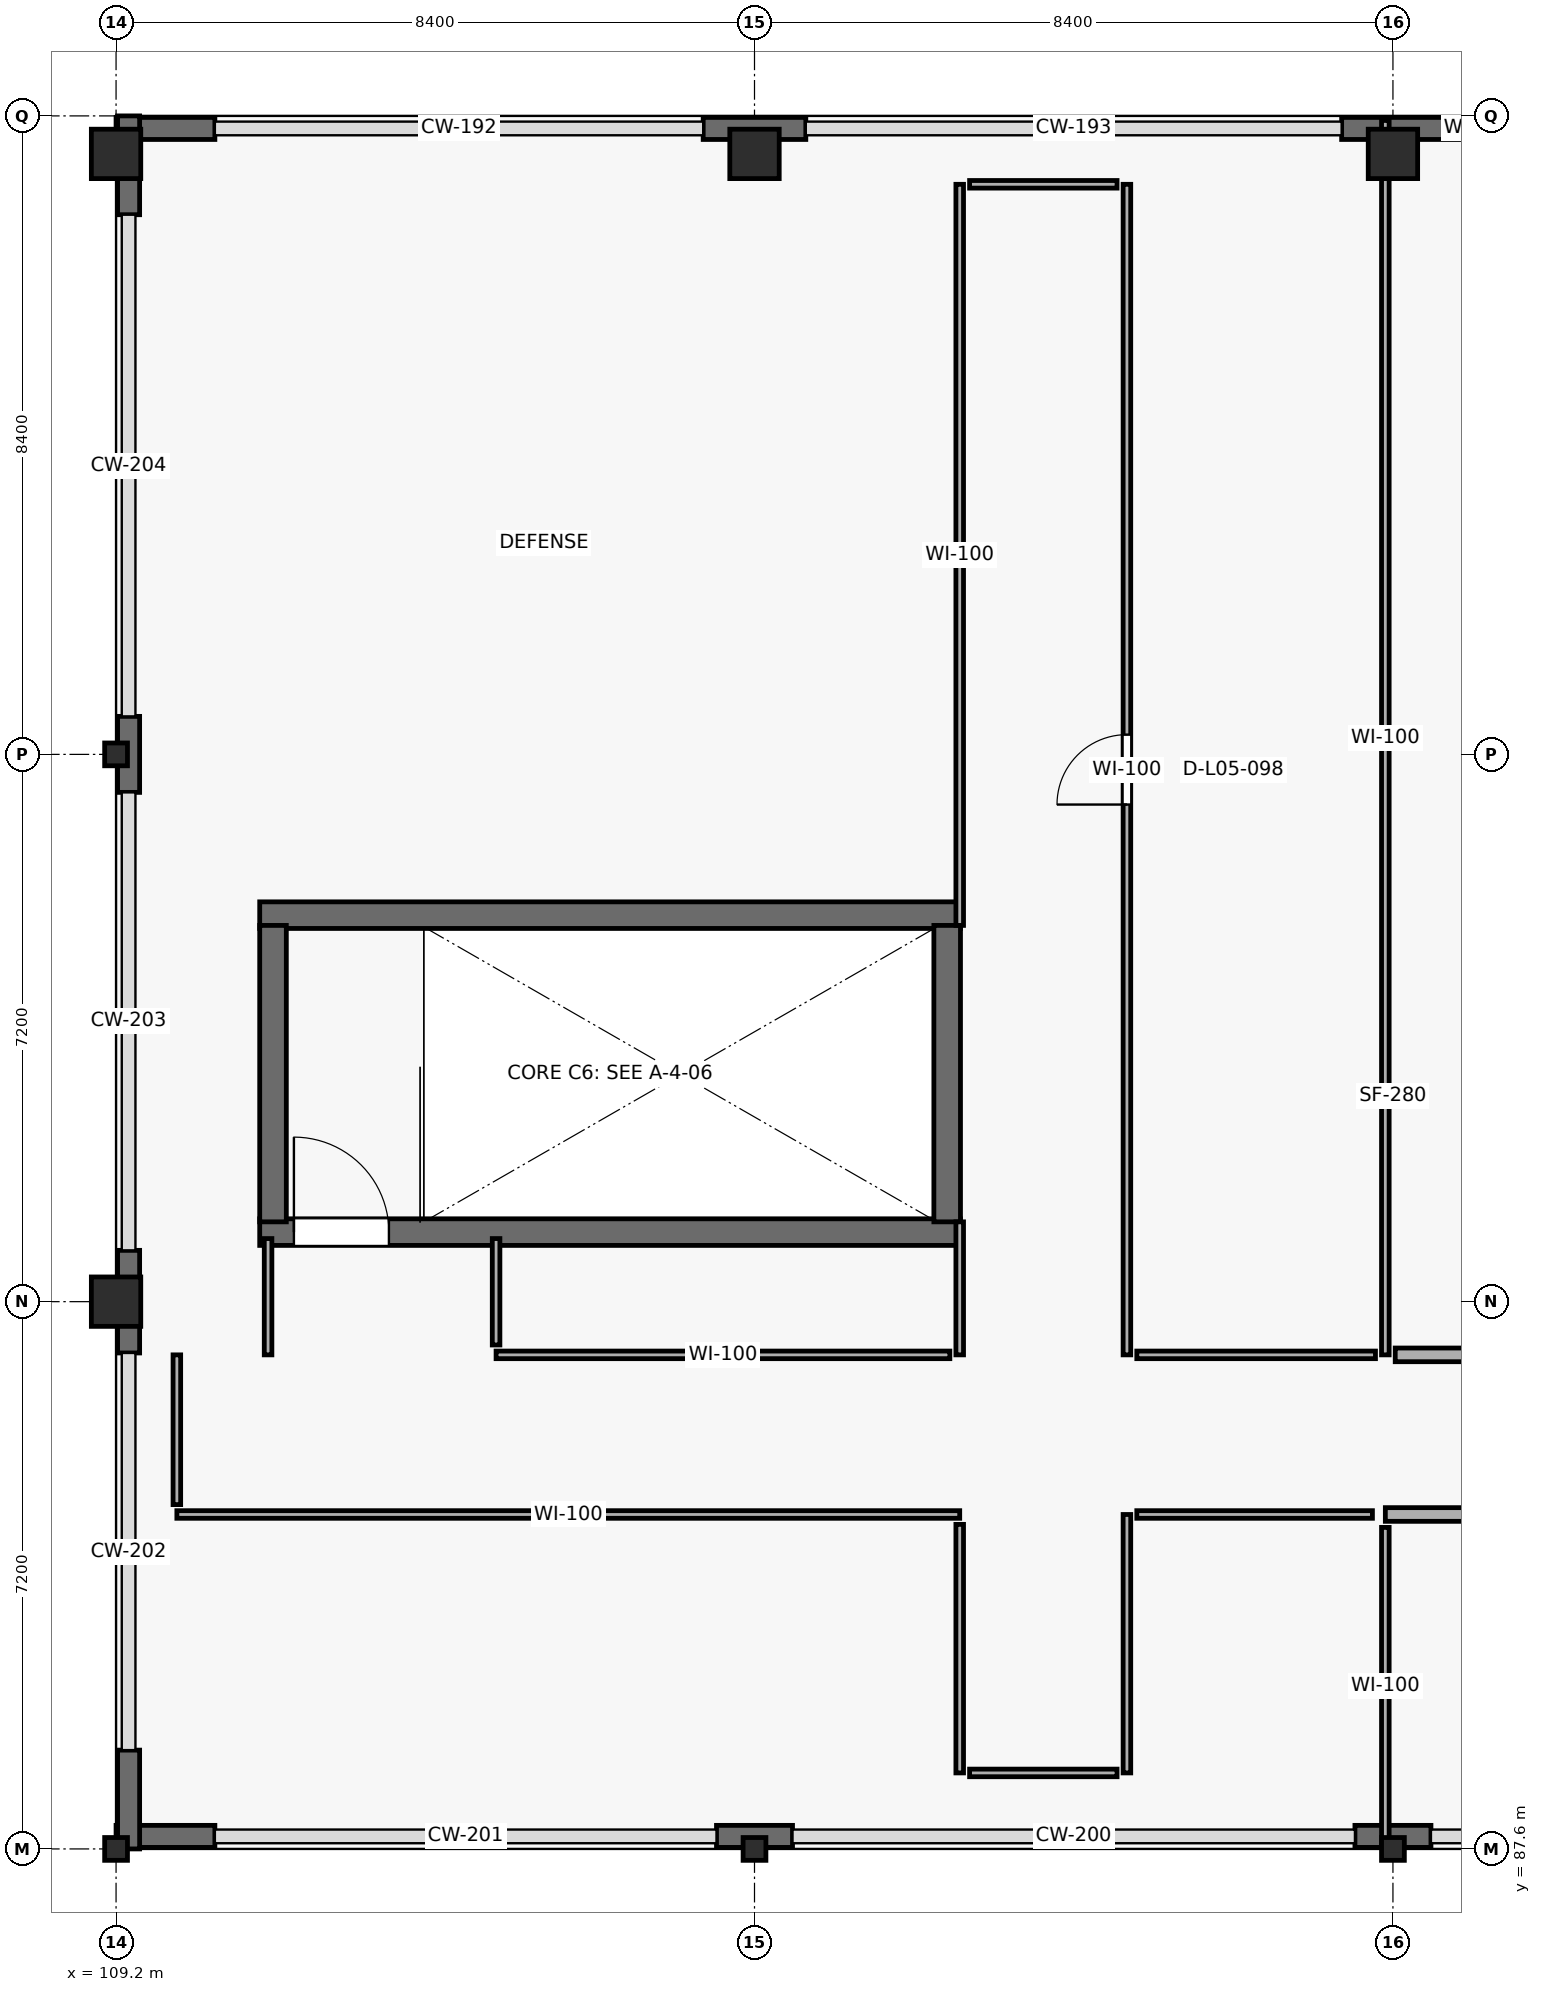
"""IFC4 building model, lengths in metres.
Left out: names, types, materials, properties, quantities, classifications, styles, units other than length and angle.
Written with IfcOpenShell. Run it as: python <this file> out.ifc"""

import sys

from ifc_helpers import new_model, si_unit, direction, frame, frame_2d, origin, origin_2d, place, context, subcontext, project, spatial, rectangle, hollow_rectangle, extrude, element, fill, save


model = new_model("IFC4")
c1 = context("Model", 3, precision=1e-05, world=origin(), true_north=direction((0.0, 1.0)))
c2 = subcontext(c1, "Body", "Model", "MODEL_VIEW")
j1 = project(units=[si_unit("LENGTHUNIT", "METRE"), si_unit("PLANEANGLEUNIT", "RADIAN")], contexts=[c1])
p1 = place(None, origin())
s1 = spatial("IfcSite", under=j1, at=p1, CompositionType="ELEMENT")
p2 = place(p1, origin())
s2 = spatial("IfcBuilding", under=s1, at=p2, CompositionType="ELEMENT")
p3 = place(p2, frame((0.0, 0.0, 20.4)))
s3 = spatial("IfcBuildingStorey", under=s2, at=p3, CompositionType="ELEMENT", Elevation=20.4)
p4 = place(p3, frame((109.2, 87.6, 0.0), z_axis=(0.0, 0.0, 1.0), x_axis=(1.0, 0.0, 0.0)))
e1 = element("IfcColumn", 1, at=p4, inside=s3, PredefinedType="COLUMN", context=c2, shape_type="SweptSolid", body=[
    extrude(hollow_rectangle(XDim=0.3, YDim=0.3, WallThickness=0.012, at=origin_2d()), origin(), (0.0, 0.0, 1.0), 5.1),
])
p5 = place(p3, frame((109.2, 94.8, 0.0), z_axis=(0.0, 0.0, 1.0), x_axis=(1.0, 0.0, 0.0)))
e2 = element("IfcColumn", 2, at=p5, inside=s3, PredefinedType="COLUMN", context=c2, shape_type="SweptSolid", body=[
    extrude(rectangle(XDim=0.65, YDim=0.65, at=origin_2d()), origin(), (0.0, 0.0, 1.0), 5.1),
])
p6 = place(p3, frame((109.2, 102.0, 0.0), z_axis=(0.0, 0.0, 1.0), x_axis=(1.0, 0.0, 0.0)))
e3 = element("IfcColumn", 3, at=p6, inside=s3, PredefinedType="COLUMN", context=c2, shape_type="SweptSolid", body=[
    extrude(hollow_rectangle(XDim=0.3, YDim=0.3, WallThickness=0.012, at=origin_2d()), origin(), (0.0, 0.0, 1.0), 5.1),
])
p7 = place(p3, frame((109.2, 109.9, 0.0), z_axis=(0.0, 0.0, 1.0), x_axis=(1.0, 0.0, 0.0)))
e4 = element("IfcColumn", 4, at=p7, inside=s3, PredefinedType="COLUMN", context=c2, shape_type="SweptSolid", body=[
    extrude(rectangle(XDim=0.65, YDim=0.65, at=origin_2d()), origin(), (0.0, 0.0, 1.0), 5.1),
])
p8 = place(p3, frame((117.6, 87.6, 0.0), z_axis=(0.0, 0.0, 1.0), x_axis=(1.0, 0.0, 0.0)))
e5 = element("IfcColumn", 5, at=p8, inside=s3, PredefinedType="COLUMN", context=c2, shape_type="SweptSolid", body=[
    extrude(hollow_rectangle(XDim=0.3, YDim=0.3, WallThickness=0.012, at=origin_2d()), origin(), (0.0, 0.0, 1.0), 5.1),
])
p9 = place(p3, frame((117.6, 109.9, 0.0), z_axis=(0.0, 0.0, 1.0), x_axis=(1.0, 0.0, 0.0)))
e6 = element("IfcColumn", 6, at=p9, inside=s3, PredefinedType="COLUMN", context=c2, shape_type="SweptSolid", body=[
    extrude(rectangle(XDim=0.65, YDim=0.65, at=origin_2d()), origin(), (0.0, 0.0, 1.0), 5.1),
])
p10 = place(p3, frame((126.0, 87.6, 0.0), z_axis=(0.0, 0.0, 1.0), x_axis=(1.0, 0.0, 0.0)))
e7 = element("IfcColumn", 7, at=p10, inside=s3, PredefinedType="COLUMN", context=c2, shape_type="SweptSolid", body=[
    extrude(hollow_rectangle(XDim=0.3, YDim=0.3, WallThickness=0.012, at=origin_2d()), origin(), (0.0, 0.0, 1.0), 5.1),
])
p11 = place(p3, frame((126.0, 109.9, 0.0), z_axis=(0.0, 0.0, 1.0), x_axis=(1.0, 0.0, 0.0)))
e8 = element("IfcColumn", 8, at=p11, inside=s3, PredefinedType="COLUMN", context=c2, shape_type="SweptSolid", body=[
    extrude(rectangle(XDim=0.65, YDim=0.65, at=origin_2d()), origin(), (0.0, 0.0, 1.0), 5.1),
])
p12 = place(p3, frame((109.2, 110.235, 0.0), z_axis=(0.0, 0.0, 1.0), x_axis=(1.0, 0.0, 0.0)))
e9 = element("IfcWall", 9, at=p12, inside=s3, PredefinedType="SOLIDWALL", context=c2, shape_type="SweptSolid", body=[
    extrude(rectangle(XDim=1.3, YDim=0.29, at=frame_2d((0.65, 0.0))), origin(), (0.0, 0.0, 1.0), 4.84),
])
p13 = place(p3, frame((116.925, 110.235, 0.0), z_axis=(0.0, 0.0, 1.0), x_axis=(1.0, 0.0, 0.0)))
e10 = element("IfcWall", 10, at=p13, inside=s3, PredefinedType="SOLIDWALL", context=c2, shape_type="SweptSolid", body=[
    extrude(rectangle(XDim=1.35, YDim=0.29, at=frame_2d((0.675, 0.0))), origin(), (0.0, 0.0, 1.0), 4.84),
])
p14 = place(p3, frame((125.325, 110.235, 0.0), z_axis=(0.0, 0.0, 1.0), x_axis=(1.0, 0.0, 0.0)))
e11 = element("IfcWall", 11, at=p14, inside=s3, PredefinedType="SOLIDWALL", context=c2, shape_type="SweptSolid", body=[
    extrude(rectangle(XDim=3.675, YDim=0.29, at=frame_2d((1.837, 0.0))), origin(), (0.0, 0.0, 1.0), 4.84),
])
for number, where, z_axis, x_axis in (
    (12, (126.5, 87.765, 0.0), (0.0, 0.0, 1.0), (-1.0, 0.0, 0.0)),
    (13, (118.1, 87.765, 0.0), (0.0, 0.0, 1.0), (-1.0, 0.0, 0.0)),
):
    element("IfcWall", number, at=place(p3, frame(where, z_axis=z_axis, x_axis=x_axis)), inside=s3, PredefinedType="SOLIDWALL", context=c2, shape_type="SweptSolid", body=[
        extrude(rectangle(XDim=1.0, YDim=0.29, at=frame_2d((0.5, 0.0))), origin(), (0.0, 0.0, 1.0), 4.84),
    ])
p15 = place(p3, frame((110.5, 87.765, 0.0), z_axis=(0.0, 0.0, 1.0), x_axis=(-1.0, 0.0, 0.0)))
e14 = element("IfcWall", 14, at=p15, inside=s3, PredefinedType="SOLIDWALL", context=c2, shape_type="SweptSolid", body=[
    extrude(rectangle(XDim=1.3, YDim=0.29, at=frame_2d((0.65, 0.0))), origin(), (0.0, 0.0, 1.0), 4.84),
])
p16 = place(p3, frame((109.365, 87.6, 0.0), z_axis=(0.0, 0.0, 1.0), x_axis=(0.0, 1.0, 0.0)))
e15 = element("IfcWall", 15, at=p16, inside=s3, PredefinedType="SOLIDWALL", context=c2, shape_type="SweptSolid", body=[
    extrude(rectangle(XDim=1.3, YDim=0.29, at=frame_2d((0.65, 0.0))), origin(), (0.0, 0.0, 1.0), 4.84),
])
p17 = place(p3, frame((109.365, 94.125, 0.0), z_axis=(0.0, 0.0, 1.0), x_axis=(0.0, 1.0, 0.0)))
e16 = element("IfcWall", 16, at=p17, inside=s3, PredefinedType="SOLIDWALL", context=c2, shape_type="SweptSolid", body=[
    extrude(rectangle(XDim=1.35, YDim=0.29, at=frame_2d((0.675, 0.0))), origin(), (0.0, 0.0, 1.0), 4.84),
])
p18 = place(p3, frame((109.365, 101.5, 0.0), z_axis=(0.0, 0.0, 1.0), x_axis=(0.0, 1.0, 0.0)))
e17 = element("IfcWall", 17, at=p18, inside=s3, PredefinedType="SOLIDWALL", context=c2, shape_type="SweptSolid", body=[
    extrude(rectangle(XDim=1.0, YDim=0.29, at=frame_2d((0.5, 0.0))), origin(), (0.0, 0.0, 1.0), 4.84),
])
p19 = place(p3, frame((109.365, 109.1, 0.0), z_axis=(0.0, 0.0, 1.0), x_axis=(0.0, 1.0, 0.0)))
e18 = element("IfcWall", 18, at=p19, inside=s3, PredefinedType="SOLIDWALL", context=c2, shape_type="SweptSolid", body=[
    extrude(rectangle(XDim=1.3, YDim=0.29, at=frame_2d((0.65, 0.0))), origin(), (0.0, 0.0, 1.0), 4.84),
])
p20 = place(p3, frame((111.09, 95.715, 0.0), z_axis=(0.0, 0.0, 1.0), x_axis=(1.0, 0.0, 0.0)))
e19 = element("IfcWall", 19, at=p20, inside=s3, PredefinedType="SHEAR", context=c2, shape_type="SweptSolid", body=[
    extrude(rectangle(XDim=9.22, YDim=0.35, at=frame_2d((4.61, 0.0))), origin(), (0.0, 0.0, 1.0), 4.84),
])
p21 = place(p20, frame((0.45, 0.0, 0.0)))
e20 = element("IfcOpeningElement", 20, at=p21, cuts=e19, PredefinedType="OPENING", context=c2, shape_type="SweptSolid", body=[
    extrude(rectangle(XDim=1.25, YDim=2.2, at=frame_2d((0.625, 1.1))), frame((0.0, 0.185, 0.0), z_axis=(0.0, -1.0, 0.0), x_axis=(1.0, 0.0, 0.0)), (0.0, 0.0, 1.0), 0.37),
])
p22 = place(p3, frame((120.31, 99.885, 0.0), z_axis=(0.0, 0.0, 1.0), x_axis=(-1.0, 0.0, 0.0)))
e21 = element("IfcWall", 21, at=p22, inside=s3, PredefinedType="SHEAR", context=c2, shape_type="SweptSolid", body=[
    extrude(rectangle(XDim=9.22, YDim=0.35, at=frame_2d((4.61, 0.0))), origin(), (0.0, 0.0, 1.0), 4.84),
])
for number, where, z_axis, x_axis in (
    (22, (111.265, 95.85, 0.0), (0.0, 0.0, 1.0), (0.0, 1.0, 0.0)),
    (23, (120.135, 99.75, 0.0), (0.0, 0.0, 1.0), (0.0, -1.0, 0.0)),
):
    element("IfcWall", number, at=place(p3, frame(where, z_axis=z_axis, x_axis=x_axis)), inside=s3, PredefinedType="SHEAR", context=c2, shape_type="SweptSolid", body=[
        extrude(rectangle(XDim=3.9, YDim=0.35, at=frame_2d((1.95, 0.0))), origin(), (0.0, 0.0, 1.0), 4.84),
    ])
p23 = place(p3, frame((125.9, 110.34, 0.0), z_axis=(0.0, 0.0, 1.0), x_axis=(0.0, -1.0, 0.0)))
e24 = element("IfcWall", 24, at=p23, inside=s3, PredefinedType="PARTITIONING", context=c2, shape_type="SweptSolid", body=[
    extrude(rectangle(XDim=16.24, YDim=0.1, at=frame_2d((8.12, 0.0))), origin(), (0.0, 0.0, 1.0), 4.84),
])
p24 = place(p3, frame((125.9, 92.0, 0.0), z_axis=(0.0, 0.0, 1.0), x_axis=(1.0, 0.0, 0.0)))
e25 = element("IfcWall", 25, at=p24, inside=s3, PredefinedType="PARTITIONING", context=c2, shape_type="SweptSolid", body=[
    extrude(rectangle(XDim=15.9, YDim=0.18, at=frame_2d((7.95, 0.0))), origin(), (0.0, 0.0, 1.0), 4.84),
])
p25 = place(p24, frame((7.764, 0.0, 0.0)))
e26 = element("IfcOpeningElement", 26, at=p25, cuts=e25, PredefinedType="OPENING", context=c2, shape_type="SweptSolid", body=[
    extrude(rectangle(XDim=2.28, YDim=2.75, at=frame_2d((1.14, 1.375))), frame((0.0, 0.1, 0.0), z_axis=(0.0, -1.0, 0.0), x_axis=(1.0, 0.0, 0.0)), (0.0, 0.0, 1.0), 0.2),
])
p26 = place(p3, frame((141.8, 94.1, 0.0), z_axis=(0.0, 0.0, 1.0), x_axis=(-1.0, 0.0, 0.0)))
e27 = element("IfcWall", 27, at=p26, inside=s3, PredefinedType="PARTITIONING", context=c2, shape_type="SweptSolid", body=[
    extrude(rectangle(XDim=15.77, YDim=0.18, at=frame_2d((7.885, 0.0))), origin(), (0.0, 0.0, 1.0), 4.84),
])
p27 = place(p3, frame((122.5, 94.1, 0.0), z_axis=(0.0, 0.0, 1.0), x_axis=(0.0, 1.0, 0.0)))
e28 = element("IfcWall", 28, at=p27, inside=s3, PredefinedType="PARTITIONING", context=c2, shape_type="SweptSolid", body=[
    extrude(rectangle(XDim=15.4, YDim=0.1, at=frame_2d((7.7, 0.0))), origin(), (0.0, 0.0, 1.0), 4.84),
])
p28 = place(p27, frame((7.24, 0.0, 0.0)))
e29 = element("IfcOpeningElement", 29, at=p28, cuts=e28, PredefinedType="OPENING", context=c2, shape_type="SweptSolid", body=[
    extrude(rectangle(XDim=0.92, YDim=2.12, at=frame_2d((0.46, 1.06))), frame((0.0, 0.06, 0.0), z_axis=(0.0, -1.0, 0.0), x_axis=(1.0, 0.0, 0.0)), (0.0, 0.0, 1.0), 0.12),
])
p29 = place(p3, frame((120.3, 109.5, 0.0), z_axis=(0.0, 0.0, 1.0), x_axis=(0.0, -1.0, 0.0)))
e30 = element("IfcWall", 30, at=p29, inside=s3, PredefinedType="PARTITIONING", context=c2, shape_type="SweptSolid", body=[
    extrude(rectangle(XDim=9.75, YDim=0.1, at=frame_2d((4.875, 0.0))), origin(), (0.0, 0.0, 1.0), 4.84),
])
p30 = place(p3, frame((120.3, 95.85, 0.0), z_axis=(0.0, 0.0, 1.0), x_axis=(0.0, -1.0, 0.0)))
e31 = element("IfcWall", 31, at=p30, inside=s3, PredefinedType="PARTITIONING", context=c2, shape_type="SweptSolid", body=[
    extrude(rectangle(XDim=1.75, YDim=0.1, at=frame_2d((0.875, 0.0))), origin(), (0.0, 0.0, 1.0), 4.84),
])
p31 = place(p3, frame((110.0, 92.0, 0.0), z_axis=(0.0, 0.0, 1.0), x_axis=(1.0, 0.0, 0.0)))
e32 = element("IfcWall", 32, at=p31, inside=s3, PredefinedType="PARTITIONING", context=c2, shape_type="SweptSolid", body=[
    extrude(rectangle(XDim=10.3, YDim=0.1, at=frame_2d((5.15, 0.0))), origin(), (0.0, 0.0, 1.0), 4.84),
])
p32 = place(p3, frame((120.17, 94.1, 0.0), z_axis=(0.0, 0.0, 1.0), x_axis=(-1.0, 0.0, 0.0)))
e33 = element("IfcWall", 33, at=p32, inside=s3, PredefinedType="PARTITIONING", context=c2, shape_type="SweptSolid", body=[
    extrude(rectangle(XDim=5.97, YDim=0.1, at=frame_2d((2.985, 0.0))), origin(), (0.0, 0.0, 1.0), 4.84),
])
p33 = place(p3, frame((125.9, 91.83, 0.0), z_axis=(0.0, 0.0, 1.0), x_axis=(0.0, -1.0, 0.0)))
e34 = element("IfcWall", 34, at=p33, inside=s3, PredefinedType="PARTITIONING", context=c2, shape_type="SweptSolid", body=[
    extrude(rectangle(XDim=4.17, YDim=0.1, at=frame_2d((2.085, 0.0))), origin(), (0.0, 0.0, 1.0), 4.84),
])
p34 = place(p3, frame((125.77, 94.1, 0.0), z_axis=(0.0, 0.0, 1.0), x_axis=(-1.0, 0.0, 0.0)))
e35 = element("IfcWall", 35, at=p34, inside=s3, PredefinedType="PARTITIONING", context=c2, shape_type="SweptSolid", body=[
    extrude(rectangle(XDim=3.14, YDim=0.1, at=frame_2d((1.57, 0.0))), origin(), (0.0, 0.0, 1.0), 4.84),
])
p35 = place(p3, frame((120.3, 91.87, 0.0), z_axis=(0.0, 0.0, 1.0), x_axis=(0.0, -1.0, 0.0)))
e36 = element("IfcWall", 36, at=p35, inside=s3, PredefinedType="PARTITIONING", context=c2, shape_type="SweptSolid", body=[
    extrude(rectangle(XDim=3.27, YDim=0.1, at=frame_2d((1.635, 0.0))), origin(), (0.0, 0.0, 1.0), 4.84),
])
p36 = place(p3, frame((122.5, 88.6, 0.0), z_axis=(0.0, 0.0, 1.0), x_axis=(0.0, 1.0, 0.0)))
e37 = element("IfcWall", 37, at=p36, inside=s3, PredefinedType="PARTITIONING", context=c2, shape_type="SweptSolid", body=[
    extrude(rectangle(XDim=3.4, YDim=0.1, at=frame_2d((1.7, 0.0))), origin(), (0.0, 0.0, 1.0), 4.84),
])
p37 = place(p3, frame((122.63, 92.0, 0.0), z_axis=(0.0, 0.0, 1.0), x_axis=(1.0, 0.0, 0.0)))
e38 = element("IfcWall", 38, at=p37, inside=s3, PredefinedType="PARTITIONING", context=c2, shape_type="SweptSolid", body=[
    extrude(rectangle(XDim=3.1, YDim=0.1, at=frame_2d((1.55, 0.0))), origin(), (0.0, 0.0, 1.0), 4.84),
])
p38 = place(p3, frame((122.37, 109.5, 0.0), z_axis=(0.0, 0.0, 1.0), x_axis=(-1.0, 0.0, 0.0)))
e39 = element("IfcWall", 39, at=p38, inside=s3, PredefinedType="PARTITIONING", context=c2, shape_type="SweptSolid", body=[
    extrude(rectangle(XDim=1.94, YDim=0.1, at=frame_2d((0.97, 0.0))), origin(), (0.0, 0.0, 1.0), 3.29),
])
p39 = place(p3, frame((120.43, 88.6, 0.0), z_axis=(0.0, 0.0, 1.0), x_axis=(1.0, 0.0, 0.0)))
e40 = element("IfcWall", 40, at=p39, inside=s3, PredefinedType="PARTITIONING", context=c2, shape_type="SweptSolid", body=[
    extrude(rectangle(XDim=1.94, YDim=0.1, at=frame_2d((0.97, 0.0))), origin(), (0.0, 0.0, 1.0), 4.84),
])
p40 = place(p3, frame((110.0, 94.1, 0.0), z_axis=(0.0, 0.0, 1.0), x_axis=(0.0, -1.0, 0.0)))
e41 = element("IfcWall", 41, at=p40, inside=s3, PredefinedType="PARTITIONING", context=c2, shape_type="SweptSolid", body=[
    extrude(rectangle(XDim=1.97, YDim=0.1, at=frame_2d((0.985, 0.0))), origin(), (0.0, 0.0, 1.0), 4.84),
])
p41 = place(p3, frame((114.2, 94.23, 0.0), z_axis=(0.0, 0.0, 1.0), x_axis=(0.0, 1.0, 0.0)))
e42 = element("IfcWall", 42, at=p41, inside=s3, PredefinedType="PARTITIONING", context=c2, shape_type="SweptSolid", body=[
    extrude(rectangle(XDim=1.4, YDim=0.1, at=frame_2d((0.7, 0.0))), origin(), (0.0, 0.0, 1.0), 4.24),
])
p42 = place(p3, frame((111.2, 95.63, 0.0), z_axis=(0.0, 0.0, 1.0), x_axis=(0.0, -1.0, 0.0)))
e43 = element("IfcWall", 43, at=p42, inside=s3, PredefinedType="PARTITIONING", context=c2, shape_type="SweptSolid", body=[
    extrude(rectangle(XDim=1.53, YDim=0.1, at=frame_2d((0.765, 0.0))), origin(), (0.0, 0.0, 1.0), 4.84),
])
p43 = place(p21, origin())
e44 = element("IfcDoor", 44, at=p43, inside=s3, OperationType="SINGLE_SWING_LEFT", PredefinedType="DOOR", context=c2, shape_type="SweptSolid", body=[
    extrude(rectangle(XDim=1.25, YDim=2.2, at=frame_2d((0.625, 1.1))), frame((0.0, 0.025, 0.0), z_axis=(0.0, -1.0, 0.0), x_axis=(1.0, 0.0, 0.0)), (0.0, 0.0, 1.0), 0.05),
])
fill(e20, e44)
p44 = place(p28, origin())
e45 = element("IfcDoor", 45, at=p44, inside=s3, OperationType="SINGLE_SWING_LEFT", PredefinedType="DOOR", context=c2, shape_type="SweptSolid", body=[
    extrude(rectangle(XDim=0.92, YDim=2.12, at=frame_2d((0.46, 1.06))), frame((0.0, 0.025, 0.0), z_axis=(0.0, -1.0, 0.0), x_axis=(1.0, 0.0, 0.0)), (0.0, 0.0, 1.0), 0.05),
])
fill(e29, e45)
save(model, sys.argv[1])
